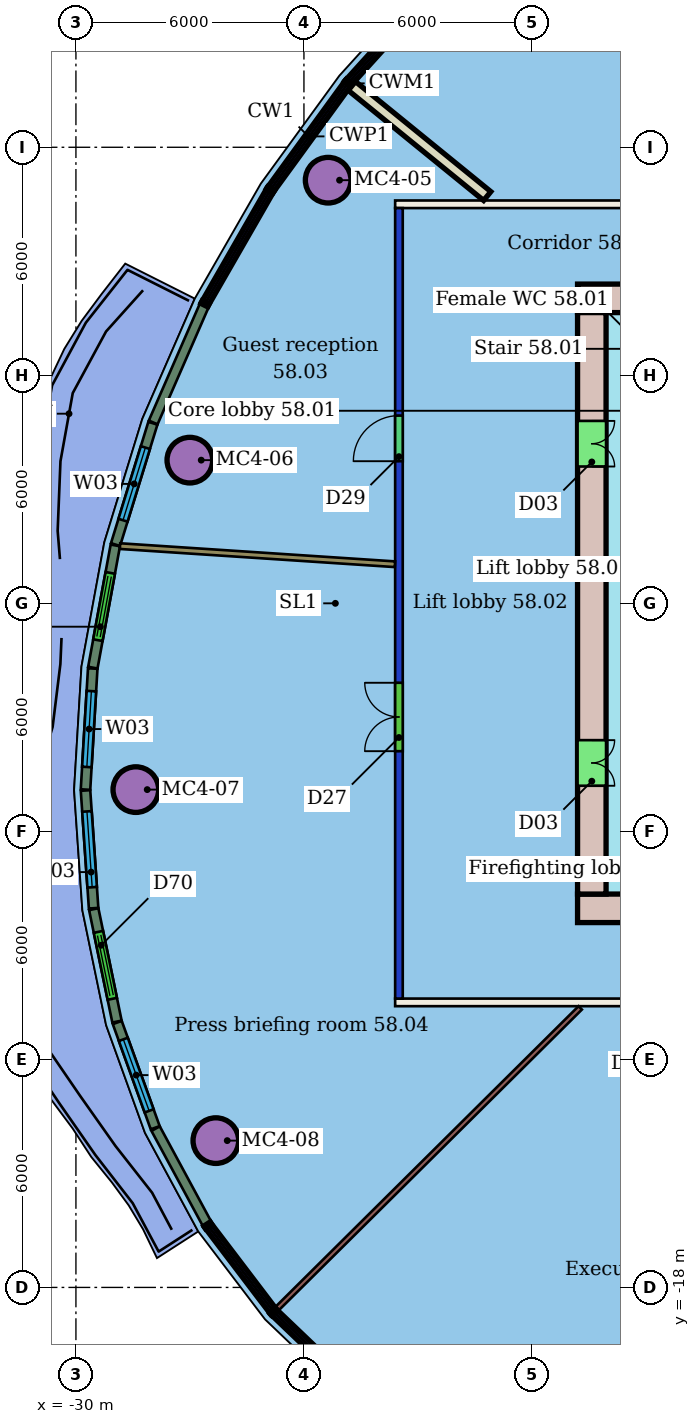
"""IFC4 building model, lengths in metres.
Left out: names, types, materials, properties, quantities, classifications, styles, units other than length and angle.
Written with IfcOpenShell. Run it as: python <this file> out.ifc"""

import sys

from ifc_helpers import new_model, si_unit, direction, frame, frame_2d, origin, origin_2d, place, context, subcontext, project, spatial, rectangle, hollow_circle, extrude, element, fill, save


model = new_model("IFC4")
c1 = context("Model", 3, precision=1e-05, world=origin(), true_north=direction((0.0, 1.0)))
c2 = subcontext(c1, "Body", "Model", "MODEL_VIEW")
j1 = project(units=[si_unit("LENGTHUNIT", "METRE"), si_unit("PLANEANGLEUNIT", "RADIAN")], contexts=[c1])
p1 = place(None, origin())
s1 = spatial("IfcSite", under=j1, at=p1, CompositionType="ELEMENT")
p2 = place(p1, origin())
s2 = spatial("IfcBuilding", under=s1, at=p2, CompositionType="ELEMENT")
p3 = place(p2, frame((0.0, 0.0, 235.3)))
s3 = spatial("IfcBuildingStorey", under=s2, at=p3, CompositionType="ELEMENT", Elevation=235.3)
for number, where, z_axis, x_axis in (
    (1, (-23.363, 11.134, 0.0), (0.0, 0.0, 1.0), (1.0, 0.0, 0.0)),
    (2, (-27.003, 3.768, 0.0), (0.0, 0.0, 1.0), (1.0, 0.0, 0.0)),
    (3, (-28.424, -4.901, 0.0), (0.0, 0.0, 1.0), (1.0, 0.0, 0.0)),
    (4, (-26.318, -14.137, 0.0), (0.0, 0.0, 1.0), (1.0, 0.0, 0.0)),
):
    element("IfcColumn", number, at=place(p3, frame(where, z_axis=z_axis, x_axis=x_axis)), inside=s3, PredefinedType="COLUMN", context=c2, shape_type="SweptSolid", body=[
        extrude(hollow_circle(Radius=0.6, WallThickness=0.045, at=origin_2d()), origin(), (0.0, 0.0, 1.0), 3.45),
    ])
p4 = place(p3, frame((9.6, -10.5, 0.0), z_axis=(0.0, 0.0, 1.0), x_axis=(-1.0, 0.0, 0.0)))
e5 = element("IfcWall", 5, at=p4, inside=s3, PredefinedType="PARTITIONING", context=c2, shape_type="SweptSolid", body=[
    extrude(rectangle(XDim=31.2, YDim=0.2, at=frame_2d((15.6, 0.0))), origin(), (0.0, 0.0, 1.0), 3.45),
])
p5 = place(p4, frame((21.654, 0.0, 0.0)))
e6 = element("IfcOpeningElement", 6, at=p5, cuts=e5, PredefinedType="OPENING", context=c2, shape_type="SweptSolid", body=[
    extrude(rectangle(XDim=1.8, YDim=2.1, at=frame_2d((0.9, 1.05))), frame((0.0, 0.11, 0.0), z_axis=(0.0, -1.0, 0.0), x_axis=(1.0, 0.0, 0.0)), (0.0, 0.0, 1.0), 0.22),
])
p6 = place(p4, frame((9.493, 0.0, 0.0)))
e7 = element("IfcOpeningElement", 7, at=p6, cuts=e5, PredefinedType="OPENING", context=c2, shape_type="SweptSolid", body=[
    extrude(rectangle(XDim=1.8, YDim=2.1, at=frame_2d((0.9, 1.05))), frame((0.0, 0.11, 0.0), z_axis=(0.0, -1.0, 0.0), x_axis=(1.0, 0.0, 0.0)), (0.0, 0.0, 1.0), 0.22),
])
p7 = place(p3, frame((-21.5, -10.4, 0.0), z_axis=(0.0, 0.0, 1.0), x_axis=(0.0, 1.0, 0.0)))
e8 = element("IfcWall", 8, at=p7, inside=s3, PredefinedType="PARTITIONING", context=c2, shape_type="SweptSolid", body=[
    extrude(rectangle(XDim=20.8, YDim=0.2, at=frame_2d((10.4, 0.0))), origin(), (0.0, 0.0, 1.0), 3.05),
])
p8 = place(p7, frame((14.14, 0.0, 0.0)))
e9 = element("IfcOpeningElement", 9, at=p8, cuts=e8, PredefinedType="OPENING", context=c2, shape_type="SweptSolid", body=[
    extrude(rectangle(XDim=1.2, YDim=2.4, at=frame_2d((0.6, 1.2))), frame((0.0, 0.11, 0.0), z_axis=(0.0, -1.0, 0.0), x_axis=(1.0, 0.0, 0.0)), (0.0, 0.0, 1.0), 0.22),
])
p9 = place(p7, frame((6.51, 0.0, 0.0)))
e10 = element("IfcOpeningElement", 10, at=p9, cuts=e8, PredefinedType="OPENING", context=c2, shape_type="SweptSolid", body=[
    extrude(rectangle(XDim=1.8, YDim=2.4, at=frame_2d((0.9, 1.2))), frame((0.0, 0.11, 0.0), z_axis=(0.0, -1.0, 0.0), x_axis=(1.0, 0.0, 0.0)), (0.0, 0.0, 1.0), 0.22),
])
p10 = place(p3, frame((-21.6, 10.5, 0.0), z_axis=(0.0, 0.0, 1.0), x_axis=(1.0, 0.0, 0.0)))
e11 = element("IfcWall", 11, at=p10, inside=s3, PredefinedType="PARTITIONING", context=c2, shape_type="SweptSolid", body=[
    extrude(rectangle(XDim=31.2, YDim=0.2, at=frame_2d((15.6, 0.0))), origin(), (0.0, 0.0, 1.0), 3.45),
])
p11 = place(p10, frame((16.544, 0.0, 0.0)))
e12 = element("IfcOpeningElement", 12, at=p11, cuts=e11, PredefinedType="OPENING", context=c2, shape_type="SweptSolid", body=[
    extrude(rectangle(XDim=1.0, YDim=2.4, at=frame_2d((0.5, 1.2))), frame((0.0, 0.11, 0.0), z_axis=(0.0, -1.0, 0.0), x_axis=(1.0, 0.0, 0.0)), (0.0, 0.0, 1.0), 0.22),
])
p12 = place(p10, frame((10.228, 0.0, 0.0)))
e13 = element("IfcOpeningElement", 13, at=p12, cuts=e11, PredefinedType="OPENING", context=c2, shape_type="SweptSolid", body=[
    extrude(rectangle(XDim=1.8, YDim=2.4, at=frame_2d((0.9, 1.2))), frame((0.0, 0.11, 0.0), z_axis=(0.0, -1.0, 0.0), x_axis=(1.0, 0.0, 0.0)), (0.0, 0.0, 1.0), 0.22),
])
p13 = place(p10, frame((21.755, 0.0, 0.0)))
e14 = element("IfcOpeningElement", 14, at=p13, cuts=e11, PredefinedType="OPENING", context=c2, shape_type="SweptSolid", body=[
    extrude(rectangle(XDim=1.8, YDim=2.4, at=frame_2d((0.9, 1.2))), frame((0.0, 0.11, 0.0), z_axis=(0.0, -1.0, 0.0), x_axis=(1.0, 0.0, 0.0)), (0.0, 0.0, 1.0), 0.22),
])
p14 = place(p3, frame((-22.74, 13.614, 0.0), z_axis=(0.0, 0.0, 1.0), x_axis=(0.775822828674, -0.63095082099, 0.0)))
e15 = element("IfcWall", 15, at=p14, inside=s3, PredefinedType="PARTITIONING", context=c2, shape_type="SweptSolid", body=[
    extrude(rectangle(XDim=4.592, YDim=0.3, at=frame_2d((2.296, 0.0))), origin(), (0.0, 0.0, 1.0), 3.45),
])
p15 = place(p3, frame((-28.84, 1.505, 0.0), z_axis=(0.0, 0.0, 1.0), x_axis=(0.997835523801, -0.065759162409, 0.0)))
e16 = element("IfcWall", 16, at=p15, inside=s3, PredefinedType="PARTITIONING", context=c2, shape_type="SweptSolid", body=[
    extrude(rectangle(XDim=7.251, YDim=0.15, at=frame_2d((3.625, 0.0))), origin(), (0.0, 0.0, 1.0), 3.45),
])
p16 = place(p3, frame((-24.707, -18.557, 0.0), z_axis=(0.0, 0.0, 1.0), x_axis=(0.709925893097, 0.704276384888, 0.0)))
e17 = element("IfcWall", 17, at=p16, inside=s3, PredefinedType="PARTITIONING", context=c2, shape_type="SweptSolid", body=[
    extrude(rectangle(XDim=11.236, YDim=0.125, at=frame_2d((5.618, 0.0))), origin(), (0.0, 0.0, 1.0), 3.45),
])
p17 = place(p3, frame((-26.626, 7.832, 0.0), z_axis=(0.0, 0.0, 1.0), x_axis=(-0.399940006996, -0.916541319747, 0.0)))
e18 = element("IfcWall", 18, at=p17, inside=s3, PredefinedType="SOLIDWALL", context=c2, shape_type="SweptSolid", body=[
    extrude(rectangle(XDim=3.353, YDim=0.25, at=frame_2d((1.676, 0.0))), origin(), (0.0, 0.0, 1.0), 3.1),
])
p18 = place(p3, frame((-27.975, 4.739, 0.0), z_axis=(0.0, 0.0, 1.0), x_axis=(-0.294306671234, -0.955711035443, 0.0)))
e19 = element("IfcWall", 19, at=p18, inside=s3, PredefinedType="SOLIDWALL", context=c2, shape_type="SweptSolid", body=[
    extrude(rectangle(XDim=3.341, YDim=0.25, at=frame_2d((1.67, 0.0))), origin(), (0.0, 0.0, 1.0), 3.1),
])
p19 = place(p18, frame((0.67, 0.0, 0.9)))
e20 = element("IfcOpeningElement", 20, at=p19, cuts=e19, PredefinedType="OPENING", context=c2, shape_type="SweptSolid", body=[
    extrude(rectangle(XDim=2.0, YDim=2.1, at=frame_2d((1.0, 1.05))), frame((0.0, 0.135, 0.0), z_axis=(0.0, -1.0, 0.0), x_axis=(1.0, 0.0, 0.0)), (0.0, 0.0, 1.0), 0.27),
])
p20 = place(p3, frame((-28.964, 1.524, 0.0), z_axis=(0.0, 0.0, 1.0), x_axis=(-0.180803315383, -0.983519273399, 0.0)))
e21 = element("IfcWall", 21, at=p20, inside=s3, PredefinedType="SOLIDWALL", context=c2, shape_type="SweptSolid", body=[
    extrude(rectangle(XDim=3.271, YDim=0.25, at=frame_2d((1.635, 0.0))), origin(), (0.0, 0.0, 1.0), 3.1),
])
p21 = place(p20, frame((0.735, 0.0, 0.0)))
e22 = element("IfcOpeningElement", 22, at=p21, cuts=e21, PredefinedType="OPENING", context=c2, shape_type="SweptSolid", body=[
    extrude(rectangle(XDim=1.8, YDim=2.4, at=frame_2d((0.9, 1.2))), frame((0.0, 0.135, 0.0), z_axis=(0.0, -1.0, 0.0), x_axis=(1.0, 0.0, 0.0)), (0.0, 0.0, 1.0), 0.27),
])
p22 = place(p3, frame((-29.558, -1.716, 0.0), z_axis=(0.0, 0.0, 1.0), x_axis=(-0.059610174745, -0.998221732416, 0.0)))
e23 = element("IfcWall", 23, at=p22, inside=s3, PredefinedType="SOLIDWALL", context=c2, shape_type="SweptSolid", body=[
    extrude(rectangle(XDim=3.19, YDim=0.25, at=frame_2d((1.595, 0.0))), origin(), (0.0, 0.0, 1.0), 3.1),
])
p23 = place(p22, frame((0.595, 0.0, 0.9)))
e24 = element("IfcOpeningElement", 24, at=p23, cuts=e23, PredefinedType="OPENING", context=c2, shape_type="SweptSolid", body=[
    extrude(rectangle(XDim=2.0, YDim=2.1, at=frame_2d((1.0, 1.05))), frame((0.0, 0.135, 0.0), z_axis=(0.0, -1.0, 0.0), x_axis=(1.0, 0.0, 0.0)), (0.0, 0.0, 1.0), 0.27),
])
p24 = place(p3, frame((-29.748, -4.924, 0.0), z_axis=(0.0, 0.0, 1.0), x_axis=(0.068637495047, -0.997641666268, 0.0)))
e25 = element("IfcWall", 25, at=p24, inside=s3, PredefinedType="SOLIDWALL", context=c2, shape_type="SweptSolid", body=[
    extrude(rectangle(XDim=3.105, YDim=0.25, at=frame_2d((1.553, 0.0))), origin(), (0.0, 0.0, 1.0), 3.1),
])
p25 = place(p24, frame((0.553, 0.0, 0.9)))
e26 = element("IfcOpeningElement", 26, at=p25, cuts=e25, PredefinedType="OPENING", context=c2, shape_type="SweptSolid", body=[
    extrude(rectangle(XDim=2.0, YDim=2.1, at=frame_2d((1.0, 1.05))), frame((0.0, 0.135, 0.0), z_axis=(0.0, -1.0, 0.0), x_axis=(1.0, 0.0, 0.0)), (0.0, 0.0, 1.0), 0.27),
])
p26 = place(p3, frame((-29.531, -8.047, 0.0), z_axis=(0.0, 0.0, 1.0), x_axis=(0.202546805283, -0.979272582925, 0.0)))
e27 = element("IfcWall", 27, at=p26, inside=s3, PredefinedType="SOLIDWALL", context=c2, shape_type="SweptSolid", body=[
    extrude(rectangle(XDim=3.021, YDim=0.25, at=frame_2d((1.51, 0.0))), origin(), (0.0, 0.0, 1.0), 3.1),
])
p27 = place(p26, frame((0.61, 0.0, 0.0)))
e28 = element("IfcOpeningElement", 28, at=p27, cuts=e27, PredefinedType="OPENING", context=c2, shape_type="SweptSolid", body=[
    extrude(rectangle(XDim=1.8, YDim=2.4, at=frame_2d((0.9, 1.2))), frame((0.0, 0.135, 0.0), z_axis=(0.0, -1.0, 0.0), x_axis=(1.0, 0.0, 0.0)), (0.0, 0.0, 1.0), 0.27),
])
p28 = place(p3, frame((-28.913, -11.03, 0.0), z_axis=(0.0, 0.0, 1.0), x_axis=(0.339430375323, -0.940631181871, 0.0)))
e29 = element("IfcWall", 29, at=p28, inside=s3, PredefinedType="SOLIDWALL", context=c2, shape_type="SweptSolid", body=[
    extrude(rectangle(XDim=2.943, YDim=0.25, at=frame_2d((1.471, 0.0))), origin(), (0.0, 0.0, 1.0), 3.1),
])
p29 = place(p28, frame((0.471, 0.0, 0.9)))
e30 = element("IfcOpeningElement", 30, at=p29, cuts=e29, PredefinedType="OPENING", context=c2, shape_type="SweptSolid", body=[
    extrude(rectangle(XDim=2.0, YDim=2.1, at=frame_2d((1.0, 1.05))), frame((0.0, 0.135, 0.0), z_axis=(0.0, -1.0, 0.0), x_axis=(1.0, 0.0, 0.0)), (0.0, 0.0, 1.0), 0.27),
])
p30 = place(p3, frame((-27.903, -13.822, 0.0), z_axis=(0.0, 0.0, 1.0), x_axis=(0.475295544149, -0.879826201992, 0.0)))
e31 = element("IfcWall", 31, at=p30, inside=s3, PredefinedType="SOLIDWALL", context=c2, shape_type="SweptSolid", body=[
    extrude(rectangle(XDim=2.836, YDim=0.25, at=frame_2d((1.418, 0.0))), origin(), (0.0, 0.0, 1.0), 3.1),
])
p31 = place(p3, frame((-6.0, 8.025, 0.0), z_axis=(0.0, 0.0, 1.0), x_axis=(-1.0, 0.0, 0.0)))
e32 = element("IfcWall", 32, at=p31, inside=s3, PredefinedType="SHEAR", context=c2, shape_type="SweptSolid", body=[
    extrude(rectangle(XDim=10.8, YDim=0.75, at=frame_2d((5.4, 0.0))), origin(), (0.0, 0.0, 1.0), 3.3),
])
p32 = place(p31, frame((5.2, 0.0, 0.0)))
e33 = element("IfcOpeningElement", 33, at=p32, cuts=e32, PredefinedType="OPENING", context=c2, shape_type="SweptSolid", body=[
    extrude(rectangle(XDim=1.2, YDim=2.1, at=frame_2d((0.6, 1.05))), frame((0.0, 0.385, 0.0), z_axis=(0.0, -1.0, 0.0), x_axis=(1.0, 0.0, 0.0)), (0.0, 0.0, 1.0), 0.77),
])
p33 = place(p3, frame((-16.8, -8.025, 0.0), z_axis=(0.0, 0.0, 1.0), x_axis=(1.0, 0.0, 0.0)))
e34 = element("IfcWall", 34, at=p33, inside=s3, PredefinedType="SHEAR", context=c2, shape_type="SweptSolid", body=[
    extrude(rectangle(XDim=21.6, YDim=0.75, at=frame_2d((10.8, 0.0))), origin(), (0.0, 0.0, 1.0), 3.3),
])
p34 = place(p33, frame((4.8, 0.0, 0.0)))
e35 = element("IfcOpeningElement", 35, at=p34, cuts=e34, PredefinedType="OPENING", context=c2, shape_type="SweptSolid", body=[
    extrude(rectangle(XDim=1.2, YDim=2.1, at=frame_2d((0.6, 1.05))), frame((0.0, 0.385, 0.0), z_axis=(0.0, -1.0, 0.0), x_axis=(1.0, 0.0, 0.0)), (0.0, 0.0, 1.0), 0.77),
])
p35 = place(p3, frame((-16.425, 7.65, 0.0), z_axis=(0.0, 0.0, 1.0), x_axis=(0.0, -1.0, 0.0)))
e36 = element("IfcWall", 36, at=p35, inside=s3, PredefinedType="SHEAR", context=c2, shape_type="SweptSolid", body=[
    extrude(rectangle(XDim=15.3, YDim=0.75, at=frame_2d((7.65, 0.0))), origin(), (0.0, 0.0, 1.0), 3.3),
])
p36 = place(p35, frame((11.25, 0.0, 0.0)))
e37 = element("IfcOpeningElement", 37, at=p36, cuts=e36, PredefinedType="OPENING", context=c2, shape_type="SweptSolid", body=[
    extrude(rectangle(XDim=1.2, YDim=2.1, at=frame_2d((0.6, 1.05))), frame((0.0, 0.385, 0.0), z_axis=(0.0, -1.0, 0.0), x_axis=(1.0, 0.0, 0.0)), (0.0, 0.0, 1.0), 0.77),
])
p37 = place(p35, frame((2.85, 0.0, 0.0)))
e38 = element("IfcOpeningElement", 38, at=p37, cuts=e36, PredefinedType="OPENING", context=c2, shape_type="SweptSolid", body=[
    extrude(rectangle(XDim=1.2, YDim=2.1, at=frame_2d((0.6, 1.05))), frame((0.0, 0.385, 0.0), z_axis=(0.0, -1.0, 0.0), x_axis=(1.0, 0.0, 0.0)), (0.0, 0.0, 1.0), 0.77),
])
p38 = place(p8, origin())
e39 = element("IfcDoor", 39, at=p38, inside=s3, OperationType="SINGLE_SWING_LEFT", PredefinedType="DOOR", context=c2, shape_type="SweptSolid", body=[
    extrude(rectangle(XDim=1.2, YDim=2.4, at=frame_2d((0.6, 1.2))), frame((0.0, 0.025, 0.0), z_axis=(0.0, -1.0, 0.0), x_axis=(1.0, 0.0, 0.0)), (0.0, 0.0, 1.0), 0.05),
])
fill(e9, e39)
p39 = place(p9, origin())
e40 = element("IfcDoor", 40, at=p39, inside=s3, OperationType="DOUBLE_DOOR_SINGLE_SWING", PredefinedType="DOOR", context=c2, shape_type="SweptSolid", body=[
    extrude(rectangle(XDim=1.8, YDim=2.4, at=frame_2d((0.9, 1.2))), frame((0.0, 0.025, 0.0), z_axis=(0.0, -1.0, 0.0), x_axis=(1.0, 0.0, 0.0)), (0.0, 0.0, 1.0), 0.05),
])
fill(e10, e40)
p40 = place(p19, origin())
e41 = element("IfcWindow", 41, at=p40, inside=s3, PartitioningType="SINGLE_PANEL", PredefinedType="WINDOW", context=c2, shape_type="SweptSolid", body=[
    extrude(rectangle(XDim=2.0, YDim=2.1, at=frame_2d((1.0, 1.05))), frame((0.0, 0.03, 0.0), z_axis=(0.0, -1.0, 0.0), x_axis=(1.0, 0.0, 0.0)), (0.0, 0.0, 1.0), 0.06),
])
fill(e20, e41)
p41 = place(p21, origin())
e42 = element("IfcDoor", 42, at=p41, inside=s3, OperationType="DOUBLE_DOOR_SLIDING", PredefinedType="DOOR", context=c2, shape_type="SweptSolid", body=[
    extrude(rectangle(XDim=1.8, YDim=2.4, at=frame_2d((0.9, 1.2))), frame((0.0, 0.025, 0.0), z_axis=(0.0, -1.0, 0.0), x_axis=(1.0, 0.0, 0.0)), (0.0, 0.0, 1.0), 0.05),
])
fill(e22, e42)
p42 = place(p23, origin())
e43 = element("IfcWindow", 43, at=p42, inside=s3, PartitioningType="SINGLE_PANEL", PredefinedType="WINDOW", context=c2, shape_type="SweptSolid", body=[
    extrude(rectangle(XDim=2.0, YDim=2.1, at=frame_2d((1.0, 1.05))), frame((0.0, 0.03, 0.0), z_axis=(0.0, -1.0, 0.0), x_axis=(1.0, 0.0, 0.0)), (0.0, 0.0, 1.0), 0.06),
])
fill(e24, e43)
p43 = place(p25, origin())
e44 = element("IfcWindow", 44, at=p43, inside=s3, PartitioningType="SINGLE_PANEL", PredefinedType="WINDOW", context=c2, shape_type="SweptSolid", body=[
    extrude(rectangle(XDim=2.0, YDim=2.1, at=frame_2d((1.0, 1.05))), frame((0.0, 0.03, 0.0), z_axis=(0.0, -1.0, 0.0), x_axis=(1.0, 0.0, 0.0)), (0.0, 0.0, 1.0), 0.06),
])
fill(e26, e44)
p44 = place(p27, origin())
e45 = element("IfcDoor", 45, at=p44, inside=s3, OperationType="DOUBLE_DOOR_SLIDING", PredefinedType="DOOR", context=c2, shape_type="SweptSolid", body=[
    extrude(rectangle(XDim=1.8, YDim=2.4, at=frame_2d((0.9, 1.2))), frame((0.0, 0.025, 0.0), z_axis=(0.0, -1.0, 0.0), x_axis=(1.0, 0.0, 0.0)), (0.0, 0.0, 1.0), 0.05),
])
fill(e28, e45)
p45 = place(p29, origin())
e46 = element("IfcWindow", 46, at=p45, inside=s3, PartitioningType="SINGLE_PANEL", PredefinedType="WINDOW", context=c2, shape_type="SweptSolid", body=[
    extrude(rectangle(XDim=2.0, YDim=2.1, at=frame_2d((1.0, 1.05))), frame((0.0, 0.03, 0.0), z_axis=(0.0, -1.0, 0.0), x_axis=(1.0, 0.0, 0.0)), (0.0, 0.0, 1.0), 0.06),
])
fill(e30, e46)
p46 = place(p36, origin())
e47 = element("IfcDoor", 47, at=p46, inside=s3, OperationType="DOUBLE_DOOR_SINGLE_SWING", PredefinedType="NOTDEFINED", context=c2, shape_type="SweptSolid", body=[
    extrude(rectangle(XDim=1.2, YDim=2.1, at=frame_2d((0.6, 1.05))), frame((0.0, 0.025, 0.0), z_axis=(0.0, -1.0, 0.0), x_axis=(1.0, 0.0, 0.0)), (0.0, 0.0, 1.0), 0.05),
])
fill(e37, e47)
p47 = place(p37, origin())
e48 = element("IfcDoor", 48, at=p47, inside=s3, OperationType="DOUBLE_DOOR_SINGLE_SWING", PredefinedType="NOTDEFINED", context=c2, shape_type="SweptSolid", body=[
    extrude(rectangle(XDim=1.2, YDim=2.1, at=frame_2d((0.6, 1.05))), frame((0.0, 0.025, 0.0), z_axis=(0.0, -1.0, 0.0), x_axis=(1.0, 0.0, 0.0)), (0.0, 0.0, 1.0), 0.05),
])
fill(e38, e48)
save(model, sys.argv[1])
